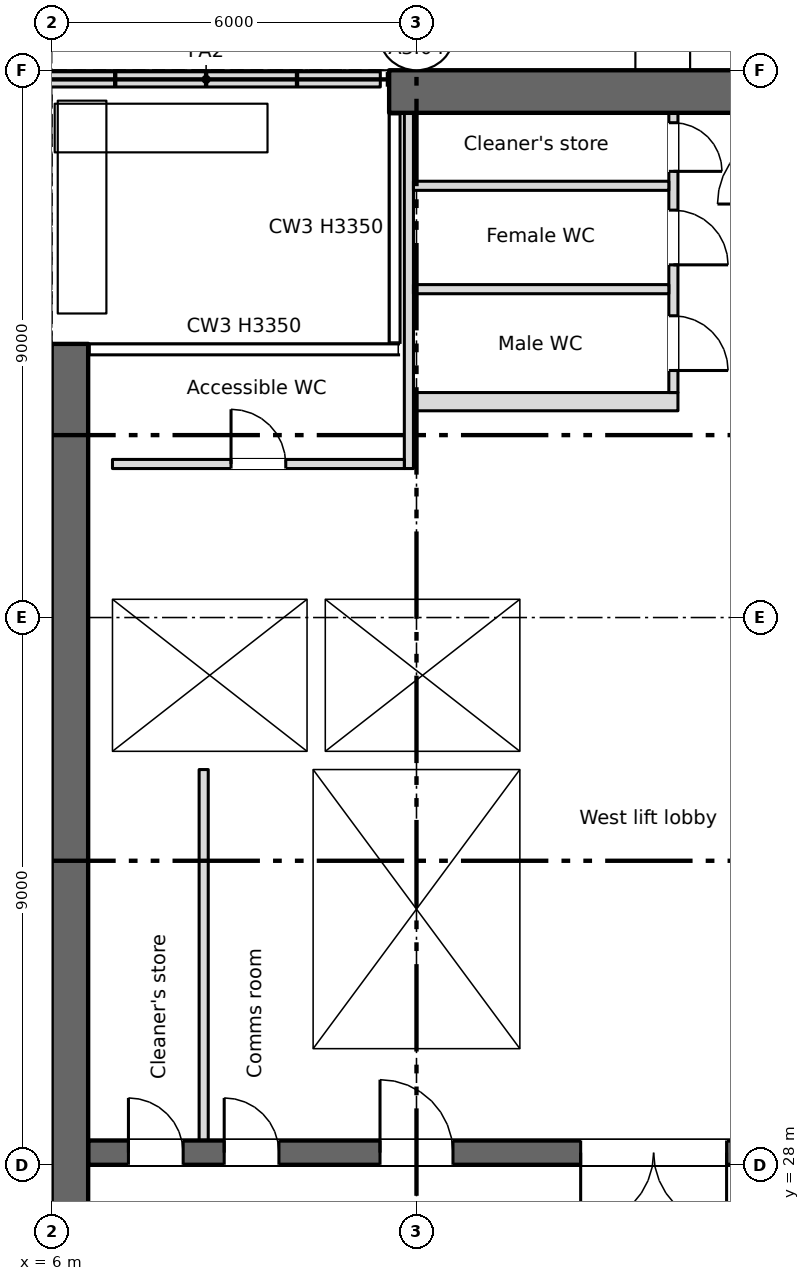
"""IFC4 building model, lengths in metres.
Left out: names, types, materials, properties, quantities, classifications, styles, units other than length and angle.
Written with IfcOpenShell. Run it as: python <this file> out.ifc"""

import sys

from ifc_helpers import new_model, si_unit, direction, frame, frame_2d, origin, place, context, subcontext, project, spatial, rectangle, extrude, element, fill, save


model = new_model("IFC4")
c1 = context("Model", 3, precision=1e-05, world=origin(), true_north=direction((0.0, 1.0)))
c2 = subcontext(c1, "Body", "Model", "MODEL_VIEW")
j1 = project(units=[si_unit("LENGTHUNIT", "METRE"), si_unit("PLANEANGLEUNIT", "RADIAN")], contexts=[c1])
p1 = place(None, origin())
s1 = spatial("IfcSite", under=j1, at=p1, CompositionType="ELEMENT")
p2 = place(p1, origin())
s2 = spatial("IfcBuilding", under=s1, at=p2, CompositionType="ELEMENT")
p3 = place(p2, frame((0.0, 0.0, 166.75)))
s3 = spatial("IfcBuildingStorey", under=s2, at=p3, CompositionType="ELEMENT", Elevation=166.75)
p4 = place(p3, frame((6.3, 7.5, 0.0), z_axis=(0.0, 0.0, 1.0), x_axis=(0.0, 1.0, 0.0)))
e1 = element("IfcWall", 1, at=p4, inside=s3, PredefinedType="SHEAR", context=c2, shape_type="SweptSolid", body=[
    extrude(rectangle(XDim=34.0, YDim=0.6, at=frame_2d((17.0, 0.0))), origin(), (0.0, 0.0, 1.0), 3.35),
])
p5 = place(p4, frame((1.2, 0.0, 0.6)))
e2 = element("IfcOpeningElement", 2, at=p5, cuts=e1, PredefinedType="OPENING", context=c2, shape_type="SweptSolid", body=[
    extrude(rectangle(XDim=0.6, YDim=2.4, at=frame_2d((0.3, 1.2))), frame((0.0, 0.31, 0.0), z_axis=(0.0, -1.0, 0.0), x_axis=(1.0, 0.0, 0.0)), (0.0, 0.0, 1.0), 0.62),
])
p6 = place(p4, frame((13.2, 0.0, 0.6)))
e3 = element("IfcOpeningElement", 3, at=p6, cuts=e1, PredefinedType="OPENING", context=c2, shape_type="SweptSolid", body=[
    extrude(rectangle(XDim=0.6, YDim=2.4, at=frame_2d((0.3, 1.2))), frame((0.0, 0.31, 0.0), z_axis=(0.0, -1.0, 0.0), x_axis=(1.0, 0.0, 0.0)), (0.0, 0.0, 1.0), 0.62),
])
p7 = place(p4, frame((19.2, 0.0, 0.6)))
e4 = element("IfcOpeningElement", 4, at=p7, cuts=e1, PredefinedType="OPENING", context=c2, shape_type="SweptSolid", body=[
    extrude(rectangle(XDim=0.6, YDim=2.4, at=frame_2d((0.3, 1.2))), frame((0.0, 0.31, 0.0), z_axis=(0.0, -1.0, 0.0), x_axis=(1.0, 0.0, 0.0)), (0.0, 0.0, 1.0), 0.62),
])
p8 = place(p4, frame((6.9, 0.0, 0.0)))
e5 = element("IfcOpeningElement", 5, at=p8, cuts=e1, PredefinedType="OPENING", context=c2, shape_type="SweptSolid", body=[
    extrude(rectangle(XDim=1.2, YDim=2.4, at=frame_2d((0.6, 1.2))), frame((0.0, 0.31, 0.0), z_axis=(0.0, -1.0, 0.0), x_axis=(1.0, 0.0, 0.0)), (0.0, 0.0, 1.0), 0.62),
])
p9 = place(p3, frame((11.55, 45.65, 0.0), z_axis=(0.0, 0.0, 1.0), x_axis=(1.0, 0.0, 0.0)))
e6 = element("IfcWall", 6, at=p9, inside=s3, PredefinedType="SHEAR", context=c2, shape_type="SweptSolid", body=[
    extrude(rectangle(XDim=54.9, YDim=0.7, at=frame_2d((27.45, 0.0))), origin(), (0.0, 0.0, 1.0), 3.35),
])
p10 = place(p3, frame((5.675, 45.85, 0.0), z_axis=(0.0, 0.0, 1.0), x_axis=(1.0, 0.0, 0.0)))
e7 = element("IfcWall", 7, at=p10, inside=s3, PredefinedType="PARAPET", context=c2, shape_type="SweptSolid", body=[
    extrude(rectangle(XDim=5.73, YDim=0.25, at=frame_2d((2.865, 0.0))), origin(), (0.0, 0.0, 1.0), 0.3),
])
p11 = place(p3, frame((6.6, 28.2, 0.0), z_axis=(0.0, 0.0, 1.0), x_axis=(1.0, 0.0, 0.0)))
e8 = element("IfcWall", 8, at=p11, inside=s3, PredefinedType="SHEAR", context=c2, shape_type="SweptSolid", body=[
    extrude(rectangle(XDim=57.9, YDim=0.4, at=frame_2d((28.95, 0.0))), origin(), (0.0, 0.0, 1.0), 3.35),
])
p12 = place(p11, frame((12.663, 0.0, 0.0)))
e9 = element("IfcOpeningElement", 9, at=p12, cuts=e8, PredefinedType="OPENING", context=c2, shape_type="SweptSolid", body=[
    extrude(rectangle(XDim=0.9, YDim=2.1, at=frame_2d((0.45, 1.05))), frame((0.0, 0.21, 0.0), z_axis=(0.0, -1.0, 0.0), x_axis=(1.0, 0.0, 0.0)), (0.0, 0.0, 1.0), 0.42),
])
p13 = place(p11, frame((15.238, 0.0, 0.0)))
e10 = element("IfcOpeningElement", 10, at=p13, cuts=e8, PredefinedType="OPENING", context=c2, shape_type="SweptSolid", body=[
    extrude(rectangle(XDim=0.9, YDim=2.1, at=frame_2d((0.45, 1.05))), frame((0.0, 0.21, 0.0), z_axis=(0.0, -1.0, 0.0), x_axis=(1.0, 0.0, 0.0)), (0.0, 0.0, 1.0), 0.42),
])
p14 = place(p11, frame((49.95, 0.0, 0.0)))
e11 = element("IfcOpeningElement", 11, at=p14, cuts=e8, PredefinedType="OPENING", context=c2, shape_type="SweptSolid", body=[
    extrude(rectangle(XDim=0.9, YDim=2.1, at=frame_2d((0.45, 1.05))), frame((0.0, 0.21, 0.0), z_axis=(0.0, -1.0, 0.0), x_axis=(1.0, 0.0, 0.0)), (0.0, 0.0, 1.0), 0.42),
])
p15 = place(p11, frame((0.663, 0.0, 0.0)))
e12 = element("IfcOpeningElement", 12, at=p15, cuts=e8, PredefinedType="OPENING", context=c2, shape_type="SweptSolid", body=[
    extrude(rectangle(XDim=0.9, YDim=2.1, at=frame_2d((0.45, 1.05))), frame((0.0, 0.21, 0.0), z_axis=(0.0, -1.0, 0.0), x_axis=(1.0, 0.0, 0.0)), (0.0, 0.0, 1.0), 0.42),
])
p16 = place(p11, frame((2.238, 0.0, 0.0)))
e13 = element("IfcOpeningElement", 13, at=p16, cuts=e8, PredefinedType="OPENING", context=c2, shape_type="SweptSolid", body=[
    extrude(rectangle(XDim=0.9, YDim=2.1, at=frame_2d((0.45, 1.05))), frame((0.0, 0.21, 0.0), z_axis=(0.0, -1.0, 0.0), x_axis=(1.0, 0.0, 0.0)), (0.0, 0.0, 1.0), 0.42),
])
p17 = place(p11, frame((4.8, 0.0, 0.0)))
e14 = element("IfcOpeningElement", 14, at=p17, cuts=e8, PredefinedType="OPENING", context=c2, shape_type="SweptSolid", body=[
    extrude(rectangle(XDim=1.2, YDim=2.1, at=frame_2d((0.6, 1.05))), frame((0.0, 0.21, 0.0), z_axis=(0.0, -1.0, 0.0), x_axis=(1.0, 0.0, 0.0)), (0.0, 0.0, 1.0), 0.42),
])
p18 = place(p11, frame((31.8, 0.0, 0.0)))
e15 = element("IfcOpeningElement", 15, at=p18, cuts=e8, PredefinedType="OPENING", context=c2, shape_type="SweptSolid", body=[
    extrude(rectangle(XDim=1.2, YDim=2.1, at=frame_2d((0.6, 1.05))), frame((0.0, 0.21, 0.0), z_axis=(0.0, -1.0, 0.0), x_axis=(1.0, 0.0, 0.0)), (0.0, 0.0, 1.0), 0.42),
])
p19 = place(p11, frame((55.3, 0.0, 0.0)))
e16 = element("IfcOpeningElement", 16, at=p19, cuts=e8, PredefinedType="OPENING", context=c2, shape_type="SweptSolid", body=[
    extrude(rectangle(XDim=1.2, YDim=2.1, at=frame_2d((0.6, 1.05))), frame((0.0, 0.21, 0.0), z_axis=(0.0, -1.0, 0.0), x_axis=(1.0, 0.0, 0.0)), (0.0, 0.0, 1.0), 0.42),
])
p20 = place(p11, frame((21.8, 0.0, 0.0)))
e17 = element("IfcOpeningElement", 17, at=p20, cuts=e8, PredefinedType="OPENING", context=c2, shape_type="SweptSolid", body=[
    extrude(rectangle(XDim=1.2, YDim=2.1, at=frame_2d((0.6, 1.05))), frame((0.0, 0.21, 0.0), z_axis=(0.0, -1.0, 0.0), x_axis=(1.0, 0.0, 0.0)), (0.0, 0.0, 1.0), 0.42),
])
p21 = place(p11, frame((41.8, 0.0, 0.0)))
e18 = element("IfcOpeningElement", 18, at=p21, cuts=e8, PredefinedType="OPENING", context=c2, shape_type="SweptSolid", body=[
    extrude(rectangle(XDim=1.2, YDim=2.1, at=frame_2d((0.6, 1.05))), frame((0.0, 0.21, 0.0), z_axis=(0.0, -1.0, 0.0), x_axis=(1.0, 0.0, 0.0)), (0.0, 0.0, 1.0), 0.42),
])
p22 = place(p11, frame((24.95, 0.0, 0.0)))
e19 = element("IfcOpeningElement", 19, at=p22, cuts=e8, PredefinedType="OPENING", context=c2, shape_type="SweptSolid", body=[
    extrude(rectangle(XDim=2.4, YDim=2.1, at=frame_2d((1.2, 1.05))), frame((0.0, 0.21, 0.0), z_axis=(0.0, -1.0, 0.0), x_axis=(1.0, 0.0, 0.0)), (0.0, 0.0, 1.0), 0.42),
])
p23 = place(p11, frame((37.45, 0.0, 0.0)))
e20 = element("IfcOpeningElement", 20, at=p23, cuts=e8, PredefinedType="OPENING", context=c2, shape_type="SweptSolid", body=[
    extrude(rectangle(XDim=2.4, YDim=2.1, at=frame_2d((1.2, 1.05))), frame((0.0, 0.21, 0.0), z_axis=(0.0, -1.0, 0.0), x_axis=(1.0, 0.0, 0.0)), (0.0, 0.0, 1.0), 0.42),
])
p24 = place(p11, frame((8.1, 0.0, 0.0)))
e21 = element("IfcOpeningElement", 21, at=p24, cuts=e8, PredefinedType="OPENING", context=c2, shape_type="SweptSolid", body=[
    extrude(rectangle(XDim=2.4, YDim=2.1, at=frame_2d((1.2, 1.05))), frame((0.0, 0.21, 0.0), z_axis=(0.0, -1.0, 0.0), x_axis=(1.0, 0.0, 0.0)), (0.0, 0.0, 1.0), 0.42),
])
p25 = place(p11, frame((28.95, 0.0, 0.0)))
e22 = element("IfcOpeningElement", 22, at=p25, cuts=e8, PredefinedType="OPENING", context=c2, shape_type="SweptSolid", body=[
    extrude(rectangle(XDim=0.9, YDim=2.1, at=frame_2d((0.45, 1.05))), frame((0.0, 0.21, 0.0), z_axis=(0.0, -1.0, 0.0), x_axis=(1.0, 0.0, 0.0)), (0.0, 0.0, 1.0), 0.42),
])
p26 = place(p11, frame((34.95, 0.0, 0.0)))
e23 = element("IfcOpeningElement", 23, at=p26, cuts=e8, PredefinedType="OPENING", context=c2, shape_type="SweptSolid", body=[
    extrude(rectangle(XDim=0.9, YDim=2.1, at=frame_2d((0.45, 1.05))), frame((0.0, 0.21, 0.0), z_axis=(0.0, -1.0, 0.0), x_axis=(1.0, 0.0, 0.0)), (0.0, 0.0, 1.0), 0.42),
])
p27 = place(p3, frame((6.8, 28.4, 0.0), z_axis=(0.0, 0.0, 1.0), x_axis=(0.0, 1.0, 0.0)))
e24 = element("IfcWall", 24, at=p27, inside=s3, PredefinedType="SHEAR", context=c2, shape_type="SweptSolid", body=[
    extrude(rectangle(XDim=12.85, YDim=0.4, at=frame_2d((6.425, 0.0))), origin(), (0.0, 0.0, 1.0), 3.35),
])
for number, where, z_axis, x_axis in (
    (25, (10.15, 28.4, 0.0), (0.0, 0.0, 1.0), (0.0, 1.0, 0.0)),
    (26, (13.85, 28.4, 0.0), (0.0, 0.0, 1.0), (0.0, 1.0, 0.0)),
):
    element("IfcWall", number, at=place(p3, frame(where, z_axis=z_axis, x_axis=x_axis)), inside=s3, PredefinedType="SHEAR", context=c2, shape_type="SweptSolid", body=[
        extrude(rectangle(XDim=6.1, YDim=0.3, at=frame_2d((3.05, 0.0))), origin(), (0.0, 0.0, 1.0), 3.35),
    ])
for number, where, z_axis, x_axis in (
    (27, (7.0, 34.65, 0.0), (0.0, 0.0, 1.0), (1.0, 0.0, 0.0)),
    (28, (7.0, 37.45, 0.0), (0.0, 0.0, 1.0), (1.0, 0.0, 0.0)),
):
    element("IfcWall", number, at=place(p3, frame(where, z_axis=z_axis, x_axis=x_axis)), inside=s3, PredefinedType="SHEAR", context=c2, shape_type="SweptSolid", body=[
        extrude(rectangle(XDim=7.0, YDim=0.3, at=frame_2d((3.5, 0.0))), origin(), (0.0, 0.0, 1.0), 3.35),
    ])
p28 = place(p3, frame((13.85, 34.8, 0.0), z_axis=(0.0, 0.0, 1.0), x_axis=(0.0, 1.0, 0.0)))
e29 = element("IfcWall", 29, at=p28, inside=s3, PredefinedType="SHEAR", context=c2, shape_type="SweptSolid", body=[
    extrude(rectangle(XDim=2.5, YDim=0.3, at=frame_2d((1.25, 0.0))), origin(), (0.0, 0.0, 1.0), 3.35),
])
p29 = place(p3, frame((11.95, 40.55, 0.0), z_axis=(0.0, 0.0, 1.0), x_axis=(1.0, 0.0, 0.0)))
e30 = element("IfcWall", 30, at=p29, inside=s3, PredefinedType="PARTITIONING", context=c2, shape_type="SweptSolid", body=[
    extrude(rectangle(XDim=4.35, YDim=0.3, at=frame_2d((2.175, 0.0))), origin(), (0.0, 0.0, 1.0), 3.35),
])
p30 = place(p3, frame((10.35, 34.8, 0.0), z_axis=(0.0, 0.0, 1.0), x_axis=(0.0, 1.0, 0.0)))
e31 = element("IfcWall", 31, at=p30, inside=s3, PredefinedType="SHEAR", context=c2, shape_type="SweptSolid", body=[
    extrude(rectangle(XDim=2.5, YDim=0.3, at=frame_2d((1.25, 0.0))), origin(), (0.0, 0.0, 1.0), 3.35),
])
p31 = place(p3, frame((16.225, 45.3, 0.0), z_axis=(0.0, 0.0, 1.0), x_axis=(0.0, -1.0, 0.0)))
e32 = element("IfcWall", 32, at=p31, inside=s3, PredefinedType="PARTITIONING", context=c2, shape_type="SweptSolid", body=[
    extrude(rectangle(XDim=4.6, YDim=0.15, at=frame_2d((2.3, 0.0))), origin(), (0.0, 0.0, 1.0), 3.35),
])
p32 = place(p31, frame((3.337, 0.0, 0.0)))
e33 = element("IfcOpeningElement", 33, at=p32, cuts=e32, PredefinedType="OPENING", context=c2, shape_type="SweptSolid", body=[
    extrude(rectangle(XDim=0.9, YDim=2.1, at=frame_2d((0.45, 1.05))), frame((0.0, 0.085, 0.0), z_axis=(0.0, -1.0, 0.0), x_axis=(1.0, 0.0, 0.0)), (0.0, 0.0, 1.0), 0.17),
])
p33 = place(p31, frame((1.6, 0.0, 0.0)))
e34 = element("IfcOpeningElement", 34, at=p33, cuts=e32, PredefinedType="OPENING", context=c2, shape_type="SweptSolid", body=[
    extrude(rectangle(XDim=0.9, YDim=2.1, at=frame_2d((0.45, 1.05))), frame((0.0, 0.085, 0.0), z_axis=(0.0, -1.0, 0.0), x_axis=(1.0, 0.0, 0.0)), (0.0, 0.0, 1.0), 0.17),
])
p34 = place(p31, frame((0.163, 0.0, 0.0)))
e35 = element("IfcOpeningElement", 35, at=p34, cuts=e32, PredefinedType="OPENING", context=c2, shape_type="SweptSolid", body=[
    extrude(rectangle(XDim=0.8, YDim=2.1, at=frame_2d((0.4, 1.05))), frame((0.0, 0.085, 0.0), z_axis=(0.0, -1.0, 0.0), x_axis=(1.0, 0.0, 0.0)), (0.0, 0.0, 1.0), 0.17),
])
p35 = place(p3, frame((8.5, 28.4, 0.0), z_axis=(0.0, 0.0, 1.0), x_axis=(0.0, 1.0, 0.0)))
e36 = element("IfcWall", 36, at=p35, inside=s3, PredefinedType="PARTITIONING", context=c2, shape_type="SweptSolid", body=[
    extrude(rectangle(XDim=6.1, YDim=0.15, at=frame_2d((3.05, 0.0))), origin(), (0.0, 0.0, 1.0), 3.35),
])
p36 = place(p3, frame((11.875, 39.45, 0.0), z_axis=(0.0, 0.0, 1.0), x_axis=(0.0, 1.0, 0.0)))
e37 = element("IfcWall", 37, at=p36, inside=s3, PredefinedType="PARTITIONING", context=c2, shape_type="SweptSolid", body=[
    extrude(rectangle(XDim=5.85, YDim=0.15, at=frame_2d((2.925, 0.0))), origin(), (0.0, 0.0, 1.0), 3.35),
])
p37 = place(p3, frame((7.0, 39.525, 0.0), z_axis=(0.0, 0.0, 1.0), x_axis=(1.0, 0.0, 0.0)))
e38 = element("IfcWall", 38, at=p37, inside=s3, PredefinedType="PARTITIONING", context=c2, shape_type="SweptSolid", body=[
    extrude(rectangle(XDim=4.8, YDim=0.15, at=frame_2d((2.4, 0.0))), origin(), (0.0, 0.0, 1.0), 3.35),
])
p38 = place(p37, frame((1.95, 0.0, 0.0)))
e39 = element("IfcOpeningElement", 39, at=p38, cuts=e38, PredefinedType="OPENING", context=c2, shape_type="SweptSolid", body=[
    extrude(rectangle(XDim=0.9, YDim=2.1, at=frame_2d((0.45, 1.05))), frame((0.0, 0.085, 0.0), z_axis=(0.0, -1.0, 0.0), x_axis=(1.0, 0.0, 0.0)), (0.0, 0.0, 1.0), 0.17),
])
for number, where, z_axis, x_axis in (
    (40, (11.95, 42.4, 0.0), (0.0, 0.0, 1.0), (1.0, 0.0, 0.0)),
    (41, (11.95, 44.1, 0.0), (0.0, 0.0, 1.0), (1.0, 0.0, 0.0)),
):
    element("IfcWall", number, at=place(p3, frame(where, z_axis=z_axis, x_axis=x_axis)), inside=s3, PredefinedType="PARTITIONING", context=c2, shape_type="SweptSolid", body=[
        extrude(rectangle(XDim=4.2, YDim=0.15, at=frame_2d((2.1, 0.0))), origin(), (0.0, 0.0, 1.0), 3.35),
    ])
p39 = place(p15, origin())
e42 = element("IfcDoor", 42, at=p39, inside=s3, OperationType="SINGLE_SWING_LEFT", PredefinedType="DOOR", context=c2, shape_type="SweptSolid", body=[
    extrude(rectangle(XDim=0.9, YDim=2.1, at=frame_2d((0.45, 1.05))), frame((0.0, 0.025, 0.0), z_axis=(0.0, -1.0, 0.0), x_axis=(1.0, 0.0, 0.0)), (0.0, 0.0, 1.0), 0.05),
])
fill(e12, e42)
p40 = place(p16, origin())
e43 = element("IfcDoor", 43, at=p40, inside=s3, OperationType="SINGLE_SWING_LEFT", PredefinedType="DOOR", context=c2, shape_type="SweptSolid", body=[
    extrude(rectangle(XDim=0.9, YDim=2.1, at=frame_2d((0.45, 1.05))), frame((0.0, 0.025, 0.0), z_axis=(0.0, -1.0, 0.0), x_axis=(1.0, 0.0, 0.0)), (0.0, 0.0, 1.0), 0.05),
])
fill(e13, e43)
p41 = place(p38, origin())
e44 = element("IfcDoor", 44, at=p41, inside=s3, OperationType="SINGLE_SWING_LEFT", PredefinedType="DOOR", context=c2, shape_type="SweptSolid", body=[
    extrude(rectangle(XDim=0.9, YDim=2.1, at=frame_2d((0.45, 1.05))), frame((0.0, 0.025, 0.0), z_axis=(0.0, -1.0, 0.0), x_axis=(1.0, 0.0, 0.0)), (0.0, 0.0, 1.0), 0.05),
])
fill(e39, e44)
p42 = place(p32, origin())
e45 = element("IfcDoor", 45, at=p42, inside=s3, OperationType="SINGLE_SWING_RIGHT", PredefinedType="DOOR", context=c2, shape_type="SweptSolid", body=[
    extrude(rectangle(XDim=0.9, YDim=2.1, at=frame_2d((0.45, 1.05))), frame((0.0, 0.025, 0.0), z_axis=(0.0, -1.0, 0.0), x_axis=(1.0, 0.0, 0.0)), (0.0, 0.0, 1.0), 0.05),
])
fill(e33, e45)
p43 = place(p33, origin())
e46 = element("IfcDoor", 46, at=p43, inside=s3, OperationType="SINGLE_SWING_RIGHT", PredefinedType="DOOR", context=c2, shape_type="SweptSolid", body=[
    extrude(rectangle(XDim=0.9, YDim=2.1, at=frame_2d((0.45, 1.05))), frame((0.0, 0.025, 0.0), z_axis=(0.0, -1.0, 0.0), x_axis=(1.0, 0.0, 0.0)), (0.0, 0.0, 1.0), 0.05),
])
fill(e34, e46)
p44 = place(p34, origin())
e47 = element("IfcDoor", 47, at=p44, inside=s3, OperationType="SINGLE_SWING_RIGHT", PredefinedType="DOOR", context=c2, shape_type="SweptSolid", body=[
    extrude(rectangle(XDim=0.8, YDim=2.1, at=frame_2d((0.4, 1.05))), frame((0.0, 0.025, 0.0), z_axis=(0.0, -1.0, 0.0), x_axis=(1.0, 0.0, 0.0)), (0.0, 0.0, 1.0), 0.05),
])
fill(e35, e47)
p45 = place(p17, origin())
e48 = element("IfcDoor", 48, at=p45, inside=s3, OperationType="SINGLE_SWING_LEFT", PredefinedType="DOOR", context=c2, shape_type="SweptSolid", body=[
    extrude(rectangle(XDim=1.2, YDim=2.1, at=frame_2d((0.6, 1.05))), frame((0.0, 0.025, 0.0), z_axis=(0.0, -1.0, 0.0), x_axis=(1.0, 0.0, 0.0)), (0.0, 0.0, 1.0), 0.05),
])
fill(e14, e48)
p46 = place(p24, origin())
e49 = element("IfcDoor", 49, at=p46, inside=s3, OperationType="DOUBLE_DOOR_SINGLE_SWING", PredefinedType="DOOR", context=c2, shape_type="SweptSolid", body=[
    extrude(rectangle(XDim=2.4, YDim=2.1, at=frame_2d((1.2, 1.05))), frame((0.0, 0.025, 0.0), z_axis=(0.0, -1.0, 0.0), x_axis=(1.0, 0.0, 0.0)), (0.0, 0.0, 1.0), 0.05),
])
fill(e21, e49)
save(model, sys.argv[1])
